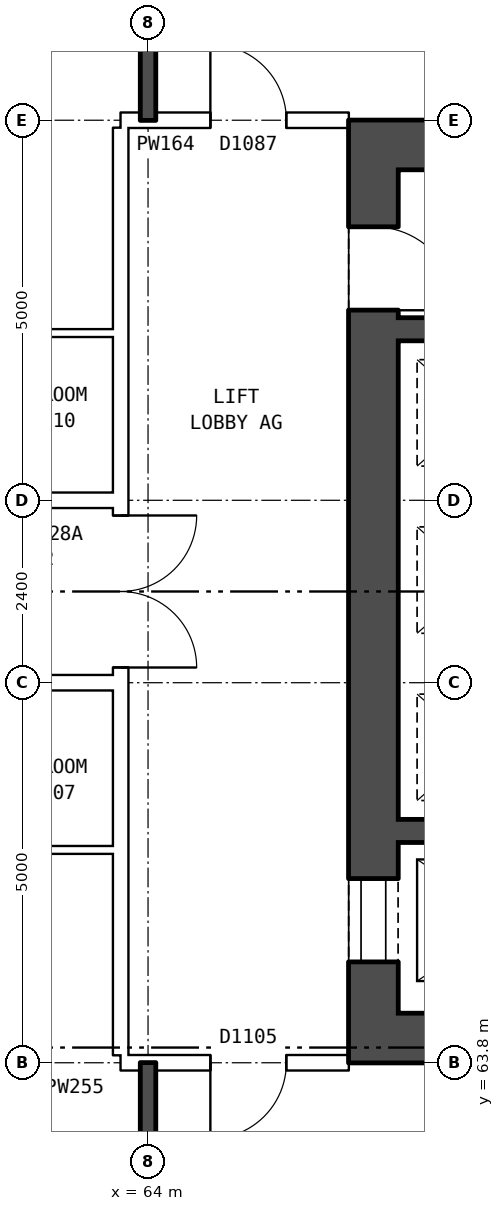
"""IFC4 building model, lengths in metres.
Left out: names, types, materials, properties, quantities, classifications, styles, units other than length and angle.
Written with IfcOpenShell. Run it as: python <this file> out.ifc"""

import sys

from ifc_helpers import new_model, si_unit, direction, frame, frame_2d, origin, place, context, subcontext, project, spatial, rectangle, extrude, element, fill, save


model = new_model("IFC4")
c1 = context("Model", 3, precision=1e-05, world=origin(), true_north=direction((0.0, 1.0)))
c2 = subcontext(c1, "Body", "Model", "MODEL_VIEW")
j1 = project(units=[si_unit("LENGTHUNIT", "METRE"), si_unit("PLANEANGLEUNIT", "RADIAN")], contexts=[c1])
p1 = place(None, origin())
s1 = spatial("IfcSite", under=j1, at=p1, CompositionType="ELEMENT")
p2 = place(p1, origin())
s2 = spatial("IfcBuilding", under=s1, at=p2, CompositionType="ELEMENT")
p3 = place(p2, frame((0.0, 0.0, 102.6)))
s3 = spatial("IfcBuildingStorey", under=s2, at=p3, CompositionType="ELEMENT", Elevation=102.6)
p4 = place(p3, frame((66.965, 64.45, 0.0), z_axis=(0.0, 0.0, 1.0), x_axis=(0.0, 1.0, 0.0)))
e1 = element("IfcWall", 1, at=p4, inside=s3, PredefinedType="SHEAR", context=c2, shape_type="SweptSolid", body=[
    extrude(rectangle(XDim=11.1, YDim=0.65, at=frame_2d((5.55, 0.0))), origin(), (0.0, 0.0, 1.0), 2.85),
])
p5 = place(p4, frame((0.675, 0.0, 0.0)))
e2 = element("IfcOpeningElement", 2, at=p5, cuts=e1, PredefinedType="OPENING", context=c2, shape_type="SweptSolid", body=[
    extrude(rectangle(XDim=1.1, YDim=2.1, at=frame_2d((0.55, 1.05))), frame((0.0, 0.335, 0.0), z_axis=(0.0, -1.0, 0.0), x_axis=(1.0, 0.0, 0.0)), (0.0, 0.0, 1.0), 0.67),
])
p6 = place(p4, frame((9.25, 0.0, 0.0)))
e3 = element("IfcOpeningElement", 3, at=p6, cuts=e1, PredefinedType="OPENING", context=c2, shape_type="SweptSolid", body=[
    extrude(rectangle(XDim=1.1, YDim=2.1, at=frame_2d((0.55, 1.05))), frame((0.0, 0.335, 0.0), z_axis=(0.0, -1.0, 0.0), x_axis=(1.0, 0.0, 0.0)), (0.0, 0.0, 1.0), 0.67),
])
for number, where, z_axis, x_axis in (
    (4, (66.64, 64.125, 0.0), (0.0, 0.0, 1.0), (1.0, 0.0, 0.0)),
    (5, (66.64, 75.875, 0.0), (0.0, 0.0, 1.0), (1.0, 0.0, 0.0)),
):
    element("IfcWall", number, at=place(p3, frame(where, z_axis=z_axis, x_axis=x_axis)), inside=s3, PredefinedType="SHEAR", context=c2, shape_type="SweptSolid", body=[
        extrude(rectangle(XDim=9.0, YDim=0.65, at=frame_2d((4.5, 0.0))), origin(), (0.0, 0.0, 1.0), 2.85),
    ])
p7 = place(p3, frame((67.29, 66.85, 0.0), z_axis=(0.0, 0.0, 1.0), x_axis=(1.0, 0.0, 0.0)))
e6 = element("IfcWall", 6, at=p7, inside=s3, PredefinedType="SHEAR", context=c2, shape_type="SweptSolid", body=[
    extrude(rectangle(XDim=3.37, YDim=0.3, at=frame_2d((1.685, 0.0))), origin(), (0.0, 0.0, 1.0), 2.85),
])
p8 = place(p3, frame((67.29, 73.45, 0.0), z_axis=(0.0, 0.0, 1.0), x_axis=(1.0, 0.0, 0.0)))
e7 = element("IfcWall", 7, at=p8, inside=s3, PredefinedType="SHEAR", context=c2, shape_type="SweptSolid", body=[
    extrude(rectangle(XDim=2.25, YDim=0.3, at=frame_2d((1.125, 0.0))), origin(), (0.0, 0.0, 1.0), 2.85),
])
p9 = place(p3, frame((63.64, 63.9, 0.0), z_axis=(0.0, 0.0, 1.0), x_axis=(0.0, 1.0, 0.0)))
e8 = element("IfcWall", 8, at=p9, inside=s3, PredefinedType="PARTITIONING", context=c2, shape_type="SweptSolid", body=[
    extrude(rectangle(XDim=12.2, YDim=0.2, at=frame_2d((6.1, 0.0))), origin(), (0.0, 0.0, 1.0), 2.85),
])
p10 = place(p9, frame((5.1, 0.0, 0.0)))
e9 = element("IfcOpeningElement", 9, at=p10, cuts=e8, PredefinedType="OPENING", context=c2, shape_type="SweptSolid", body=[
    extrude(rectangle(XDim=2.0, YDim=2.1, at=frame_2d((1.0, 1.05))), frame((0.0, 0.11, 0.0), z_axis=(0.0, -1.0, 0.0), x_axis=(1.0, 0.0, 0.0)), (0.0, 0.0, 1.0), 0.22),
])
p11 = place(p3, frame((63.64, 63.8, 0.0), z_axis=(0.0, 0.0, 1.0), x_axis=(1.0, 0.0, 0.0)))
e10 = element("IfcWall", 10, at=p11, inside=s3, PredefinedType="PARTITIONING", context=c2, shape_type="SweptSolid", body=[
    extrude(rectangle(XDim=3.0, YDim=0.2, at=frame_2d((1.5, 0.0))), origin(), (0.0, 0.0, 1.0), 2.85),
])
p12 = place(p11, frame((1.18, 0.0, 0.0)))
e11 = element("IfcOpeningElement", 11, at=p12, cuts=e10, PredefinedType="OPENING", context=c2, shape_type="SweptSolid", body=[
    extrude(rectangle(XDim=1.0, YDim=2.1, at=frame_2d((0.5, 1.05))), frame((0.0, 0.11, 0.0), z_axis=(0.0, -1.0, 0.0), x_axis=(1.0, 0.0, 0.0)), (0.0, 0.0, 1.0), 0.22),
])
p13 = place(p3, frame((61.0, 66.6, 0.0), z_axis=(0.0, 0.0, 1.0), x_axis=(1.0, 0.0, 0.0)))
e12 = element("IfcWall", 12, at=p13, inside=s3, PredefinedType="PARTITIONING", context=c2, shape_type="SweptSolid", body=[
    extrude(rectangle(XDim=2.64, YDim=0.1, at=frame_2d((1.32, 0.0))), origin(), (0.0, 0.0, 1.0), 2.85),
])
p14 = place(p3, frame((44.36, 68.8, 0.0), z_axis=(0.0, 0.0, 1.0), x_axis=(1.0, 0.0, 0.0)))
e13 = element("IfcWall", 13, at=p14, inside=s3, PredefinedType="PARTITIONING", context=c2, shape_type="SweptSolid", body=[
    extrude(rectangle(XDim=19.28, YDim=0.2, at=frame_2d((9.64, 0.0))), origin(), (0.0, 0.0, 1.0), 2.85),
])
p15 = place(p14, frame((14.64, 0.0, 0.0)))
e14 = element("IfcOpeningElement", 14, at=p15, cuts=e13, PredefinedType="OPENING", context=c2, shape_type="SweptSolid", body=[
    extrude(rectangle(XDim=1.0, YDim=2.1, at=frame_2d((0.5, 1.05))), frame((0.0, 0.11, 0.0), z_axis=(0.0, -1.0, 0.0), x_axis=(1.0, 0.0, 0.0)), (0.0, 0.0, 1.0), 0.22),
])
p16 = place(p14, frame((11.64, 0.0, 0.0)))
e15 = element("IfcOpeningElement", 15, at=p16, cuts=e13, PredefinedType="OPENING", context=c2, shape_type="SweptSolid", body=[
    extrude(rectangle(XDim=1.0, YDim=2.1, at=frame_2d((0.5, 1.05))), frame((0.0, 0.11, 0.0), z_axis=(0.0, -1.0, 0.0), x_axis=(1.0, 0.0, 0.0)), (0.0, 0.0, 1.0), 0.22),
])
p17 = place(p14, frame((5.64, 0.0, 0.0)))
e16 = element("IfcOpeningElement", 16, at=p17, cuts=e13, PredefinedType="OPENING", context=c2, shape_type="SweptSolid", body=[
    extrude(rectangle(XDim=1.0, YDim=2.1, at=frame_2d((0.5, 1.05))), frame((0.0, 0.11, 0.0), z_axis=(0.0, -1.0, 0.0), x_axis=(1.0, 0.0, 0.0)), (0.0, 0.0, 1.0), 0.22),
])
p18 = place(p3, frame((44.36, 71.2, 0.0), z_axis=(0.0, 0.0, 1.0), x_axis=(1.0, 0.0, 0.0)))
e17 = element("IfcWall", 17, at=p18, inside=s3, PredefinedType="PARTITIONING", context=c2, shape_type="SweptSolid", body=[
    extrude(rectangle(XDim=19.28, YDim=0.2, at=frame_2d((9.64, 0.0))), origin(), (0.0, 0.0, 1.0), 2.85),
])
p19 = place(p18, frame((14.64, 0.0, 0.0)))
e18 = element("IfcOpeningElement", 18, at=p19, cuts=e17, PredefinedType="OPENING", context=c2, shape_type="SweptSolid", body=[
    extrude(rectangle(XDim=1.0, YDim=2.1, at=frame_2d((0.5, 1.05))), frame((0.0, 0.11, 0.0), z_axis=(0.0, -1.0, 0.0), x_axis=(1.0, 0.0, 0.0)), (0.0, 0.0, 1.0), 0.22),
])
p20 = place(p18, frame((5.64, 0.0, 0.0)))
e19 = element("IfcOpeningElement", 19, at=p20, cuts=e17, PredefinedType="OPENING", context=c2, shape_type="SweptSolid", body=[
    extrude(rectangle(XDim=1.0, YDim=2.1, at=frame_2d((0.5, 1.05))), frame((0.0, 0.11, 0.0), z_axis=(0.0, -1.0, 0.0), x_axis=(1.0, 0.0, 0.0)), (0.0, 0.0, 1.0), 0.22),
])
p21 = place(p3, frame((61.0, 73.4, 0.0), z_axis=(0.0, 0.0, 1.0), x_axis=(1.0, 0.0, 0.0)))
e20 = element("IfcWall", 20, at=p21, inside=s3, PredefinedType="PARTITIONING", context=c2, shape_type="SweptSolid", body=[
    extrude(rectangle(XDim=2.64, YDim=0.1, at=frame_2d((1.32, 0.0))), origin(), (0.0, 0.0, 1.0), 2.85),
])
p22 = place(p3, frame((63.64, 76.2, 0.0), z_axis=(0.0, 0.0, 1.0), x_axis=(1.0, 0.0, 0.0)))
e21 = element("IfcWall", 21, at=p22, inside=s3, PredefinedType="PARTITIONING", context=c2, shape_type="SweptSolid", body=[
    extrude(rectangle(XDim=3.0, YDim=0.2, at=frame_2d((1.5, 0.0))), origin(), (0.0, 0.0, 1.0), 2.85),
])
p23 = place(p22, frame((1.18, 0.0, 0.0)))
e22 = element("IfcOpeningElement", 22, at=p23, cuts=e21, PredefinedType="OPENING", context=c2, shape_type="SweptSolid", body=[
    extrude(rectangle(XDim=1.0, YDim=2.1, at=frame_2d((0.5, 1.05))), frame((0.0, 0.11, 0.0), z_axis=(0.0, -1.0, 0.0), x_axis=(1.0, 0.0, 0.0)), (0.0, 0.0, 1.0), 0.22),
])
for number, where, z_axis, x_axis in (
    (23, (64.0, 54.36, 0.0), (0.0, 0.0, 1.0), (0.0, 1.0, 0.0)),
    (24, (64.0, 76.2, 0.0), (0.0, 0.0, 1.0), (0.0, 1.0, 0.0)),
):
    element("IfcWall", number, at=place(p3, frame(where, z_axis=z_axis, x_axis=x_axis)), inside=s3, PredefinedType="SOLIDWALL", context=c2, shape_type="SweptSolid", body=[
        extrude(rectangle(XDim=9.44, YDim=0.2, at=frame_2d((4.72, 0.0))), origin(), (0.0, 0.0, 1.0), 2.85),
    ])
p24 = place(p5, origin())
e25 = element("IfcDoor", 25, at=p24, inside=s3, OperationType="DOUBLE_DOOR_SLIDING", PredefinedType="DOOR", context=c2, shape_type="SweptSolid", body=[
    extrude(rectangle(XDim=1.1, YDim=2.1, at=frame_2d((0.55, 1.05))), frame((0.0, -0.26, 0.0), z_axis=(0.0, -1.0, 0.0), x_axis=(1.0, 0.0, 0.0)), (0.0, 0.0, 1.0), 0.05),
])
fill(e2, e25)
p25 = place(p6, frame((1.1, 0.0, 0.0), z_axis=(0.0, 0.0, 1.0), x_axis=(-1.0, 0.0, 0.0)))
e26 = element("IfcDoor", 26, at=p25, inside=s3, OperationType="SINGLE_SWING_RIGHT", PredefinedType="DOOR", context=c2, shape_type="SweptSolid", body=[
    extrude(rectangle(XDim=1.1, YDim=2.1, at=frame_2d((0.55, 1.05))), frame((0.0, 0.31, 0.0), z_axis=(0.0, -1.0, 0.0), x_axis=(1.0, 0.0, 0.0)), (0.0, 0.0, 1.0), 0.05),
])
fill(e3, e26)
p26 = place(p10, frame((2.0, 0.0, 0.0), z_axis=(0.0, 0.0, 1.0), x_axis=(-1.0, 0.0, 0.0)))
e27 = element("IfcDoor", 27, at=p26, inside=s3, OperationType="DOUBLE_DOOR_SINGLE_SWING", PredefinedType="DOOR", context=c2, shape_type="SweptSolid", body=[
    extrude(rectangle(XDim=2.0, YDim=2.1, at=frame_2d((1.0, 1.05))), frame((0.0, 0.025, 0.0), z_axis=(0.0, -1.0, 0.0), x_axis=(1.0, 0.0, 0.0)), (0.0, 0.0, 1.0), 0.05),
])
fill(e9, e27)
p27 = place(p12, frame((1.0, 0.0, 0.0), z_axis=(0.0, 0.0, 1.0), x_axis=(-1.0, 0.0, 0.0)))
e28 = element("IfcDoor", 28, at=p27, inside=s3, OperationType="SINGLE_SWING_RIGHT", PredefinedType="DOOR", context=c2, shape_type="SweptSolid", body=[
    extrude(rectangle(XDim=1.0, YDim=2.1, at=frame_2d((0.5, 1.05))), frame((0.0, 0.025, 0.0), z_axis=(0.0, -1.0, 0.0), x_axis=(1.0, 0.0, 0.0)), (0.0, 0.0, 1.0), 0.05),
])
fill(e11, e28)
p28 = place(p23, origin())
e29 = element("IfcDoor", 29, at=p28, inside=s3, OperationType="SINGLE_SWING_LEFT", PredefinedType="DOOR", context=c2, shape_type="SweptSolid", body=[
    extrude(rectangle(XDim=1.0, YDim=2.1, at=frame_2d((0.5, 1.05))), frame((0.0, 0.025, 0.0), z_axis=(0.0, -1.0, 0.0), x_axis=(1.0, 0.0, 0.0)), (0.0, 0.0, 1.0), 0.05),
])
fill(e22, e29)
save(model, sys.argv[1])
